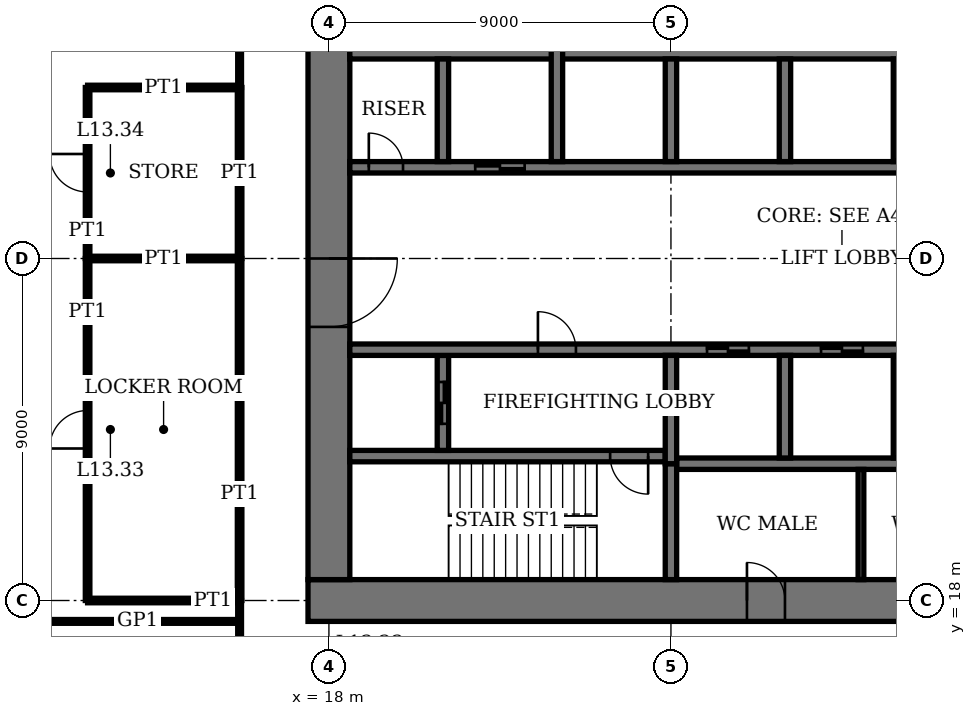
"""IFC4 building model, lengths in metres.
Left out: names, types, materials, properties, quantities, classifications, styles, units other than length and angle.
Written with IfcOpenShell. Run it as: python <this file> out.ifc"""

import sys

from ifc_helpers import new_model, si_unit, direction, frame, frame_2d, origin, place, context, subcontext, project, spatial, rectangle, extrude, element, fill, save


model = new_model("IFC4")
c1 = context("Model", 3, precision=1e-05, world=origin(), true_north=direction((0.0, 1.0)))
c2 = subcontext(c1, "Body", "Model", "MODEL_VIEW")
j1 = project(units=[si_unit("LENGTHUNIT", "METRE"), si_unit("PLANEANGLEUNIT", "RADIAN")], contexts=[c1])
p1 = place(None, origin())
s1 = spatial("IfcSite", under=j1, at=p1, CompositionType="ELEMENT")
p2 = place(p1, origin())
s2 = spatial("IfcBuilding", under=s1, at=p2, CompositionType="ELEMENT")
p3 = place(p2, frame((0.0, 0.0, 55.8)))
s3 = spatial("IfcBuildingStorey", under=s2, at=p3, CompositionType="ELEMENT", Elevation=55.8)
p4 = place(p3, frame((17.45, 18.0, 0.0), z_axis=(0.0, 0.0, 1.0), x_axis=(1.0, 0.0, 0.0)))
e1 = element("IfcWall", 1, at=p4, inside=s3, PredefinedType="SHEAR", context=c2, shape_type="SweptSolid", body=[
    extrude(rectangle(XDim=28.1, YDim=1.1, at=frame_2d((14.05, 0.0))), origin(), (0.0, 0.0, 1.0), 4.0),
])
p5 = place(p4, frame((11.55, 0.0, 0.0)))
e2 = element("IfcOpeningElement", 2, at=p5, cuts=e1, PredefinedType="OPENING", context=c2, shape_type="SweptSolid", body=[
    extrude(rectangle(XDim=1.0, YDim=2.4, at=frame_2d((0.5, 1.2))), frame((0.0, 0.56, 0.0), z_axis=(0.0, -1.0, 0.0), x_axis=(1.0, 0.0, 0.0)), (0.0, 0.0, 1.0), 1.12),
])
p6 = place(p4, frame((16.55, 0.0, 0.0)))
e3 = element("IfcOpeningElement", 3, at=p6, cuts=e1, PredefinedType="OPENING", context=c2, shape_type="SweptSolid", body=[
    extrude(rectangle(XDim=1.0, YDim=2.4, at=frame_2d((0.5, 1.2))), frame((0.0, 0.56, 0.0), z_axis=(0.0, -1.0, 0.0), x_axis=(1.0, 0.0, 0.0)), (0.0, 0.0, 1.0), 1.12),
])
p7 = place(p4, frame((20.0, 0.0, 0.0)))
e4 = element("IfcOpeningElement", 4, at=p7, cuts=e1, PredefinedType="OPENING", context=c2, shape_type="SweptSolid", body=[
    extrude(rectangle(XDim=1.1, YDim=2.4, at=frame_2d((0.55, 1.2))), frame((0.0, 0.56, 0.0), z_axis=(0.0, -1.0, 0.0), x_axis=(1.0, 0.0, 0.0)), (0.0, 0.0, 1.0), 1.12),
])
p8 = place(p4, frame((24.05, 0.0, 0.0)))
e5 = element("IfcOpeningElement", 5, at=p8, cuts=e1, PredefinedType="OPENING", context=c2, shape_type="SweptSolid", body=[
    extrude(rectangle(XDim=1.0, YDim=2.4, at=frame_2d((0.5, 1.2))), frame((0.0, 0.56, 0.0), z_axis=(0.0, -1.0, 0.0), x_axis=(1.0, 0.0, 0.0)), (0.0, 0.0, 1.0), 1.12),
])
p9 = place(p3, frame((18.0, 35.45, 0.0), z_axis=(0.0, 0.0, 1.0), x_axis=(0.0, -1.0, 0.0)))
e6 = element("IfcWall", 6, at=p9, inside=s3, PredefinedType="SHEAR", context=c2, shape_type="SweptSolid", body=[
    extrude(rectangle(XDim=16.9, YDim=1.1, at=frame_2d((8.45, 0.0))), origin(), (0.0, 0.0, 1.0), 4.0),
])
p10 = place(p9, frame((8.45, 0.0, 0.0)))
e7 = element("IfcOpeningElement", 7, at=p10, cuts=e6, PredefinedType="OPENING", context=c2, shape_type="SweptSolid", body=[
    extrude(rectangle(XDim=1.8, YDim=2.4, at=frame_2d((0.9, 1.2))), frame((0.0, 0.56, 0.0), z_axis=(0.0, -1.0, 0.0), x_axis=(1.0, 0.0, 0.0)), (0.0, 0.0, 1.0), 1.12),
])
p11 = place(p3, frame((18.55, 21.8, 0.0), z_axis=(0.0, 0.0, 1.0), x_axis=(1.0, 0.0, 0.0)))
e8 = element("IfcWall", 8, at=p11, inside=s3, PredefinedType="SHEAR", context=c2, shape_type="SweptSolid", body=[
    extrude(rectangle(XDim=8.3, YDim=0.3, at=frame_2d((4.15, 0.0))), origin(), (0.0, 0.0, 1.0), 4.0),
])
p12 = place(p11, frame((6.85, 0.0, 0.0)))
e9 = element("IfcOpeningElement", 9, at=p12, cuts=e8, PredefinedType="OPENING", context=c2, shape_type="SweptSolid", body=[
    extrude(rectangle(XDim=1.0, YDim=2.4, at=frame_2d((0.5, 1.2))), frame((0.0, 0.16, 0.0), z_axis=(0.0, -1.0, 0.0), x_axis=(1.0, 0.0, 0.0)), (0.0, 0.0, 1.0), 0.32),
])
p13 = place(p3, frame((27.0, 18.55, 0.0), z_axis=(0.0, 0.0, 1.0), x_axis=(0.0, 1.0, 0.0)))
e10 = element("IfcWall", 10, at=p13, inside=s3, PredefinedType="SHEAR", context=c2, shape_type="SweptSolid", body=[
    extrude(rectangle(XDim=3.05, YDim=0.3, at=frame_2d((1.525, 0.0))), origin(), (0.0, 0.0, 1.0), 4.0),
])
p14 = place(p3, frame((21.0, 21.95, 0.0), z_axis=(0.0, 0.0, 1.0), x_axis=(0.0, 1.0, 0.0)))
e11 = element("IfcWall", 11, at=p14, inside=s3, PredefinedType="SHEAR", context=c2, shape_type="SweptSolid", body=[
    extrude(rectangle(XDim=2.5, YDim=0.3, at=frame_2d((1.25, 0.0))), origin(), (0.0, 0.0, 1.0), 4.0),
])
p15 = place(p14, frame((0.7, 0.0, 0.0)))
e12 = element("IfcOpeningElement", 12, at=p15, cuts=e11, PredefinedType="OPENING", context=c2, shape_type="SweptSolid", body=[
    extrude(rectangle(XDim=1.1, YDim=2.4, at=frame_2d((0.55, 1.2))), frame((0.0, 0.16, 0.0), z_axis=(0.0, -1.0, 0.0), x_axis=(1.0, 0.0, 0.0)), (0.0, 0.0, 1.0), 0.32),
])
p16 = place(p3, frame((18.55, 24.6, 0.0), z_axis=(0.0, 0.0, 1.0), x_axis=(1.0, 0.0, 0.0)))
e13 = element("IfcWall", 13, at=p16, inside=s3, PredefinedType="SHEAR", context=c2, shape_type="SweptSolid", body=[
    extrude(rectangle(XDim=25.9, YDim=0.3, at=frame_2d((12.95, 0.0))), origin(), (0.0, 0.0, 1.0), 4.0),
])
p17 = place(p16, frame((4.95, 0.0, 0.0)))
e14 = element("IfcOpeningElement", 14, at=p17, cuts=e13, PredefinedType="OPENING", context=c2, shape_type="SweptSolid", body=[
    extrude(rectangle(XDim=1.0, YDim=2.4, at=frame_2d((0.5, 1.2))), frame((0.0, 0.16, 0.0), z_axis=(0.0, -1.0, 0.0), x_axis=(1.0, 0.0, 0.0)), (0.0, 0.0, 1.0), 0.32),
])
p18 = place(p16, frame((24.5, 0.0, 0.0)))
e15 = element("IfcOpeningElement", 15, at=p18, cuts=e13, PredefinedType="OPENING", context=c2, shape_type="SweptSolid", body=[
    extrude(rectangle(XDim=0.9, YDim=2.1, at=frame_2d((0.45, 1.05))), frame((0.0, 0.16, 0.0), z_axis=(0.0, -1.0, 0.0), x_axis=(1.0, 0.0, 0.0)), (0.0, 0.0, 1.0), 0.32),
])
p19 = place(p16, frame((9.4, 0.0, 0.0)))
e16 = element("IfcOpeningElement", 16, at=p19, cuts=e13, PredefinedType="OPENING", context=c2, shape_type="SweptSolid", body=[
    extrude(rectangle(XDim=1.1, YDim=2.4, at=frame_2d((0.55, 1.2))), frame((0.0, 0.16, 0.0), z_axis=(0.0, -1.0, 0.0), x_axis=(1.0, 0.0, 0.0)), (0.0, 0.0, 1.0), 0.32),
])
p20 = place(p16, frame((12.4, 0.0, 0.0)))
e17 = element("IfcOpeningElement", 17, at=p20, cuts=e13, PredefinedType="OPENING", context=c2, shape_type="SweptSolid", body=[
    extrude(rectangle(XDim=1.1, YDim=2.4, at=frame_2d((0.55, 1.2))), frame((0.0, 0.16, 0.0), z_axis=(0.0, -1.0, 0.0), x_axis=(1.0, 0.0, 0.0)), (0.0, 0.0, 1.0), 0.32),
])
p21 = place(p16, frame((15.4, 0.0, 0.0)))
e18 = element("IfcOpeningElement", 18, at=p21, cuts=e13, PredefinedType="OPENING", context=c2, shape_type="SweptSolid", body=[
    extrude(rectangle(XDim=1.1, YDim=2.4, at=frame_2d((0.55, 1.2))), frame((0.0, 0.16, 0.0), z_axis=(0.0, -1.0, 0.0), x_axis=(1.0, 0.0, 0.0)), (0.0, 0.0, 1.0), 0.32),
])
p22 = place(p16, frame((18.4, 0.0, 0.0)))
e19 = element("IfcOpeningElement", 19, at=p22, cuts=e13, PredefinedType="OPENING", context=c2, shape_type="SweptSolid", body=[
    extrude(rectangle(XDim=1.1, YDim=2.4, at=frame_2d((0.55, 1.2))), frame((0.0, 0.16, 0.0), z_axis=(0.0, -1.0, 0.0), x_axis=(1.0, 0.0, 0.0)), (0.0, 0.0, 1.0), 0.32),
])
p23 = place(p16, frame((21.3, 0.0, 0.0)))
e20 = element("IfcOpeningElement", 20, at=p23, cuts=e13, PredefinedType="OPENING", context=c2, shape_type="SweptSolid", body=[
    extrude(rectangle(XDim=1.3, YDim=2.4, at=frame_2d((0.65, 1.2))), frame((0.0, 0.16, 0.0), z_axis=(0.0, -1.0, 0.0), x_axis=(1.0, 0.0, 0.0)), (0.0, 0.0, 1.0), 0.32),
])
p24 = place(p3, frame((18.55, 29.4, 0.0), z_axis=(0.0, 0.0, 1.0), x_axis=(1.0, 0.0, 0.0)))
e21 = element("IfcWall", 21, at=p24, inside=s3, PredefinedType="SHEAR", context=c2, shape_type="SweptSolid", body=[
    extrude(rectangle(XDim=25.9, YDim=0.3, at=frame_2d((12.95, 0.0))), origin(), (0.0, 0.0, 1.0), 4.0),
])
p25 = place(p24, frame((19.95, 0.0, 0.0)))
e22 = element("IfcOpeningElement", 22, at=p25, cuts=e21, PredefinedType="OPENING", context=c2, shape_type="SweptSolid", body=[
    extrude(rectangle(XDim=1.0, YDim=2.4, at=frame_2d((0.5, 1.2))), frame((0.0, 0.16, 0.0), z_axis=(0.0, -1.0, 0.0), x_axis=(1.0, 0.0, 0.0)), (0.0, 0.0, 1.0), 0.32),
])
p26 = place(p24, frame((0.5, 0.0, 0.0)))
e23 = element("IfcOpeningElement", 23, at=p26, cuts=e21, PredefinedType="OPENING", context=c2, shape_type="SweptSolid", body=[
    extrude(rectangle(XDim=0.9, YDim=2.1, at=frame_2d((0.45, 1.05))), frame((0.0, 0.16, 0.0), z_axis=(0.0, -1.0, 0.0), x_axis=(1.0, 0.0, 0.0)), (0.0, 0.0, 1.0), 0.32),
])
p27 = place(p24, frame((3.3, 0.0, 0.0)))
e24 = element("IfcOpeningElement", 24, at=p27, cuts=e21, PredefinedType="OPENING", context=c2, shape_type="SweptSolid", body=[
    extrude(rectangle(XDim=1.3, YDim=2.4, at=frame_2d((0.65, 1.2))), frame((0.0, 0.16, 0.0), z_axis=(0.0, -1.0, 0.0), x_axis=(1.0, 0.0, 0.0)), (0.0, 0.0, 1.0), 0.32),
])
for number, where, z_axis, x_axis in (
    (25, (27.15, 21.6, 0.0), (0.0, 0.0, 1.0), (1.0, 0.0, 0.0)),
    (26, (18.55, 32.4, 0.0), (0.0, 0.0, 1.0), (1.0, 0.0, 0.0)),
):
    element("IfcWall", number, at=place(p3, frame(where, z_axis=z_axis, x_axis=x_axis)), inside=s3, PredefinedType="SHEAR", context=c2, shape_type="SweptSolid", body=[
        extrude(rectangle(XDim=17.3, YDim=0.3, at=frame_2d((8.65, 0.0))), origin(), (0.0, 0.0, 1.0), 4.0),
    ])
for number, where, z_axis, x_axis in (
    (27, (30.0, 21.75, 0.0), (0.0, 0.0, 1.0), (0.0, 1.0, 0.0)),
    (28, (33.0, 29.55, 0.0), (0.0, 0.0, 1.0), (0.0, 1.0, 0.0)),
    (29, (33.0, 21.75, 0.0), (0.0, 0.0, 1.0), (0.0, 1.0, 0.0)),
    (30, (30.0, 29.55, 0.0), (0.0, 0.0, 1.0), (0.0, 1.0, 0.0)),
    (31, (27.0, 29.55, 0.0), (0.0, 0.0, 1.0), (0.0, 1.0, 0.0)),
):
    element("IfcWall", number, at=place(p3, frame(where, z_axis=z_axis, x_axis=x_axis)), inside=s3, PredefinedType="SHEAR", context=c2, shape_type="SweptSolid", body=[
        extrude(rectangle(XDim=2.7, YDim=0.3, at=frame_2d((1.35, 0.0))), origin(), (0.0, 0.0, 1.0), 4.0),
    ])
p28 = place(p3, frame((24.0, 29.55, 0.0), z_axis=(0.0, 0.0, 1.0), x_axis=(0.0, 1.0, 0.0)))
e32 = element("IfcWall", 32, at=p28, inside=s3, PredefinedType="SHEAR", context=c2, shape_type="SweptSolid", body=[
    extrude(rectangle(XDim=5.9, YDim=0.3, at=frame_2d((2.95, 0.0))), origin(), (0.0, 0.0, 1.0), 4.0),
])
p29 = place(p3, frame((21.0, 29.55, 0.0), z_axis=(0.0, 0.0, 1.0), x_axis=(0.0, 1.0, 0.0)))
e33 = element("IfcWall", 33, at=p29, inside=s3, PredefinedType="SHEAR", context=c2, shape_type="SweptSolid", body=[
    extrude(rectangle(XDim=2.7, YDim=0.3, at=frame_2d((1.35, 0.0))), origin(), (0.0, 0.0, 1.0), 4.0),
])
p30 = place(p3, frame((27.0, 21.6, 0.0), z_axis=(0.0, 0.0, 1.0), x_axis=(0.0, 1.0, 0.0)))
e34 = element("IfcWall", 34, at=p30, inside=s3, PredefinedType="SHEAR", context=c2, shape_type="SweptSolid", body=[
    extrude(rectangle(XDim=2.85, YDim=0.3, at=frame_2d((1.425, 0.0))), origin(), (0.0, 0.0, 1.0), 4.0),
])
p31 = place(p3, frame((10.075, 17.45, 0.0), z_axis=(0.0, 0.0, 1.0), x_axis=(1.0, 0.0, 0.0)))
e35 = element("IfcWall", 35, at=p31, inside=s3, PredefinedType="PARTITIONING", context=c2, shape_type="SweptSolid", body=[
    extrude(rectangle(XDim=5.575, YDim=0.1, at=frame_2d((2.788, 0.0))), origin(), (0.0, 0.0, 1.0), 3.75),
])
for number, where, z_axis, x_axis in (
    (36, (11.65, 18.0, 0.0), (0.0, 0.0, 1.0), (1.0, 0.0, 0.0)),
    (37, (11.65, 27.0, 0.0), (0.0, 0.0, 1.0), (1.0, 0.0, 0.0)),
):
    element("IfcWall", number, at=place(p3, frame(where, z_axis=z_axis, x_axis=x_axis)), inside=s3, PredefinedType="PARTITIONING", context=c2, shape_type="SweptSolid", body=[
        extrude(rectangle(XDim=4.0, YDim=0.12, at=frame_2d((2.0, 0.0))), origin(), (0.0, 0.0, 1.0), 3.05),
    ])
p32 = place(p3, frame((11.65, 31.5, 0.0), z_axis=(0.0, 0.0, 1.0), x_axis=(1.0, 0.0, 0.0)))
e38 = element("IfcWall", 38, at=p32, inside=s3, PredefinedType="PARTITIONING", context=c2, shape_type="SweptSolid", body=[
    extrude(rectangle(XDim=4.0, YDim=0.12, at=frame_2d((2.0, 0.0))), origin(), (0.0, 0.0, 1.0), 3.1),
])
p33 = place(p3, frame((11.65, 18.0, 0.0), z_axis=(0.0, 0.0, 1.0), x_axis=(0.0, 1.0, 0.0)))
e39 = element("IfcWall", 39, at=p33, inside=s3, PredefinedType="PARTITIONING", context=c2, shape_type="SweptSolid", body=[
    extrude(rectangle(XDim=9.0, YDim=0.12, at=frame_2d((4.5, 0.0))), origin(), (0.0, 0.0, 1.0), 3.75),
])
p34 = place(p33, frame((4.0, 0.0, 0.0)))
e40 = element("IfcOpeningElement", 40, at=p34, cuts=e39, PredefinedType="OPENING", context=c2, shape_type="SweptSolid", body=[
    extrude(rectangle(XDim=1.0, YDim=2.4, at=frame_2d((0.5, 1.2))), frame((0.0, 0.07, 0.0), z_axis=(0.0, -1.0, 0.0), x_axis=(1.0, 0.0, 0.0)), (0.0, 0.0, 1.0), 0.14),
])
p35 = place(p3, frame((11.65, 27.0, 0.0), z_axis=(0.0, 0.0, 1.0), x_axis=(0.0, 1.0, 0.0)))
e41 = element("IfcWall", 41, at=p35, inside=s3, PredefinedType="PARTITIONING", context=c2, shape_type="SweptSolid", body=[
    extrude(rectangle(XDim=4.5, YDim=0.12, at=frame_2d((2.25, 0.0))), origin(), (0.0, 0.0, 1.0), 3.75),
])
p36 = place(p35, frame((1.75, 0.0, 0.0)))
e42 = element("IfcOpeningElement", 42, at=p36, cuts=e41, PredefinedType="OPENING", context=c2, shape_type="SweptSolid", body=[
    extrude(rectangle(XDim=1.0, YDim=2.4, at=frame_2d((0.5, 1.2))), frame((0.0, 0.07, 0.0), z_axis=(0.0, -1.0, 0.0), x_axis=(1.0, 0.0, 0.0)), (0.0, 0.0, 1.0), 0.14),
])
p37 = place(p3, frame((15.65, 18.0, 0.0), z_axis=(0.0, 0.0, 1.0), x_axis=(0.0, 1.0, 0.0)))
e43 = element("IfcWall", 43, at=p37, inside=s3, PredefinedType="PARTITIONING", context=c2, shape_type="SweptSolid", body=[
    extrude(rectangle(XDim=9.0, YDim=0.12, at=frame_2d((4.5, 0.0))), origin(), (0.0, 0.0, 1.0), 3.75),
])
p38 = place(p3, frame((15.65, 27.0, 0.0), z_axis=(0.0, 0.0, 1.0), x_axis=(0.0, 1.0, 0.0)))
e44 = element("IfcWall", 44, at=p38, inside=s3, PredefinedType="PARTITIONING", context=c2, shape_type="SweptSolid", body=[
    extrude(rectangle(XDim=4.5, YDim=0.12, at=frame_2d((2.25, 0.0))), origin(), (0.0, 0.0, 1.0), 3.75),
])
p39 = place(p3, frame((15.65, 15.65, 0.0), z_axis=(0.0, 0.0, 1.0), x_axis=(0.0, 1.0, 0.0)))
e45 = element("IfcWall", 45, at=p39, inside=s3, PredefinedType="PARTITIONING", context=c2, shape_type="SweptSolid", body=[
    extrude(rectangle(XDim=2.35, YDim=0.1, at=frame_2d((1.175, 0.0))), origin(), (0.0, 0.0, 1.0), 3.75),
])
p40 = place(p3, frame((15.65, 31.5, 0.0), z_axis=(0.0, 0.0, 1.0), x_axis=(0.0, 1.0, 0.0)))
e46 = element("IfcWall", 46, at=p40, inside=s3, PredefinedType="PARTITIONING", context=c2, shape_type="SweptSolid", body=[
    extrude(rectangle(XDim=6.85, YDim=0.1, at=frame_2d((3.425, 0.0))), origin(), (0.0, 0.0, 1.0), 3.75),
])
p41 = place(p40, frame((2.925, 0.0, 0.0)))
e47 = element("IfcOpeningElement", 47, at=p41, cuts=e46, PredefinedType="OPENING", context=c2, shape_type="SweptSolid", body=[
    extrude(rectangle(XDim=1.0, YDim=2.4, at=frame_2d((0.5, 1.2))), frame((0.0, 0.06, 0.0), z_axis=(0.0, -1.0, 0.0), x_axis=(1.0, 0.0, 0.0)), (0.0, 0.0, 1.0), 0.12),
])
p42 = place(p3, frame((32.0, 18.55, 0.0), z_axis=(0.0, 0.0, 1.0), x_axis=(0.0, 1.0, 0.0)))
e48 = element("IfcWall", 48, at=p42, inside=s3, PredefinedType="PARTITIONING", context=c2, shape_type="SweptSolid", body=[
    extrude(rectangle(XDim=2.9, YDim=0.15, at=frame_2d((1.45, 0.0))), origin(), (0.0, 0.0, 1.0), 3.75),
])
p43 = place(p10, origin())
e49 = element("IfcDoor", 49, at=p43, inside=s3, OperationType="DOUBLE_DOOR_DOUBLE_SWING", PredefinedType="DOOR", context=c2, shape_type="SweptSolid", body=[
    extrude(rectangle(XDim=1.8, YDim=2.4, at=frame_2d((0.9, 1.2))), frame((0.0, 0.03, 0.0), z_axis=(0.0, -1.0, 0.0), x_axis=(1.0, 0.0, 0.0)), (0.0, 0.0, 1.0), 0.06),
    extrude(rectangle(XDim=0.04, YDim=2.4, at=frame_2d((0.02, 1.2))), frame((0.0, 0.55, 0.0), z_axis=(0.0, -1.0, 0.0), x_axis=(1.0, 0.0, 0.0)), (0.0, 0.0, 1.0), 1.1),
    extrude(rectangle(XDim=0.04, YDim=2.4, at=frame_2d((1.78, 1.2))), frame((0.0, 0.55, 0.0), z_axis=(0.0, -1.0, 0.0), x_axis=(1.0, 0.0, 0.0)), (0.0, 0.0, 1.0), 1.1),
    extrude(rectangle(XDim=1.8, YDim=0.04, at=frame_2d((0.9, 2.38))), frame((0.0, 0.55, 0.0), z_axis=(0.0, -1.0, 0.0), x_axis=(1.0, 0.0, 0.0)), (0.0, 0.0, 1.0), 1.1),
])
fill(e7, e49)
p44 = place(p5, origin())
e50 = element("IfcDoor", 50, at=p44, inside=s3, OperationType="SINGLE_SWING_RIGHT", PredefinedType="DOOR", context=c2, shape_type="SweptSolid", body=[
    extrude(rectangle(XDim=1.0, YDim=2.4, at=frame_2d((0.5, 1.2))), frame((0.0, 0.025, 0.0), z_axis=(0.0, -1.0, 0.0), x_axis=(1.0, 0.0, 0.0)), (0.0, 0.0, 1.0), 0.05),
    extrude(rectangle(XDim=0.04, YDim=2.4, at=frame_2d((0.02, 1.2))), frame((0.0, 0.4, 0.0), z_axis=(0.0, -1.0, 0.0), x_axis=(1.0, 0.0, 0.0)), (0.0, 0.0, 1.0), 0.8),
    extrude(rectangle(XDim=0.04, YDim=2.4, at=frame_2d((0.98, 1.2))), frame((0.0, 0.4, 0.0), z_axis=(0.0, -1.0, 0.0), x_axis=(1.0, 0.0, 0.0)), (0.0, 0.0, 1.0), 0.8),
    extrude(rectangle(XDim=1.0, YDim=0.04, at=frame_2d((0.5, 2.38))), frame((0.0, 0.4, 0.0), z_axis=(0.0, -1.0, 0.0), x_axis=(1.0, 0.0, 0.0)), (0.0, 0.0, 1.0), 0.8),
])
fill(e2, e50)
p45 = place(p12, origin())
e51 = element("IfcDoor", 51, at=p45, inside=s3, OperationType="SINGLE_SWING_RIGHT", PredefinedType="DOOR", context=c2, shape_type="SweptSolid", body=[
    extrude(rectangle(XDim=1.0, YDim=2.4, at=frame_2d((0.5, 1.2))), frame((0.0, 0.03, 0.0), z_axis=(0.0, -1.0, 0.0), x_axis=(1.0, 0.0, 0.0)), (0.0, 0.0, 1.0), 0.06),
])
fill(e9, e51)
p46 = place(p17, origin())
e52 = element("IfcDoor", 52, at=p46, inside=s3, OperationType="SINGLE_SWING_RIGHT", PredefinedType="DOOR", context=c2, shape_type="SweptSolid", body=[
    extrude(rectangle(XDim=1.0, YDim=2.4, at=frame_2d((0.5, 1.2))), frame((0.0, 0.03, 0.0), z_axis=(0.0, -1.0, 0.0), x_axis=(1.0, 0.0, 0.0)), (0.0, 0.0, 1.0), 0.06),
])
fill(e14, e52)
p47 = place(p26, origin())
e53 = element("IfcDoor", 53, at=p47, inside=s3, OperationType="SINGLE_SWING_RIGHT", PredefinedType="DOOR", context=c2, shape_type="SweptSolid", body=[
    extrude(rectangle(XDim=0.9, YDim=2.1, at=frame_2d((0.45, 1.05))), frame((0.0, 0.03, 0.0), z_axis=(0.0, -1.0, 0.0), x_axis=(1.0, 0.0, 0.0)), (0.0, 0.0, 1.0), 0.06),
])
fill(e23, e53)
p48 = place(p34, origin())
e54 = element("IfcDoor", 54, at=p48, inside=s3, OperationType="SINGLE_SWING_RIGHT", PredefinedType="DOOR", context=c2, shape_type="SweptSolid", body=[
    extrude(rectangle(XDim=1.0, YDim=2.4, at=frame_2d((0.5, 1.2))), frame((0.0, 0.025, 0.0), z_axis=(0.0, -1.0, 0.0), x_axis=(1.0, 0.0, 0.0)), (0.0, 0.0, 1.0), 0.05),
])
fill(e40, e54)
p49 = place(p36, origin())
e55 = element("IfcDoor", 55, at=p49, inside=s3, OperationType="SINGLE_SWING_LEFT", PredefinedType="DOOR", context=c2, shape_type="SweptSolid", body=[
    extrude(rectangle(XDim=1.0, YDim=2.4, at=frame_2d((0.5, 1.2))), frame((0.0, 0.025, 0.0), z_axis=(0.0, -1.0, 0.0), x_axis=(1.0, 0.0, 0.0)), (0.0, 0.0, 1.0), 0.05),
])
fill(e42, e55)
p50 = place(p19, origin())
e56 = element("IfcDoor", 56, at=p50, inside=s3, OperationType="DOUBLE_DOOR_SLIDING", PredefinedType="DOOR", context=c2, shape_type="SweptSolid", body=[
    extrude(rectangle(XDim=1.1, YDim=2.4, at=frame_2d((0.55, 1.2))), frame((0.0, 0.02, 0.0), z_axis=(0.0, -1.0, 0.0), x_axis=(1.0, 0.0, 0.0)), (0.0, 0.0, 1.0), 0.04),
])
fill(e16, e56)
p51 = place(p20, origin())
e57 = element("IfcDoor", 57, at=p51, inside=s3, OperationType="DOUBLE_DOOR_SLIDING", PredefinedType="DOOR", context=c2, shape_type="SweptSolid", body=[
    extrude(rectangle(XDim=1.1, YDim=2.4, at=frame_2d((0.55, 1.2))), frame((0.0, 0.02, 0.0), z_axis=(0.0, -1.0, 0.0), x_axis=(1.0, 0.0, 0.0)), (0.0, 0.0, 1.0), 0.04),
])
fill(e17, e57)
p52 = place(p27, origin())
e58 = element("IfcDoor", 58, at=p52, inside=s3, OperationType="DOUBLE_DOOR_SLIDING", PredefinedType="DOOR", context=c2, shape_type="SweptSolid", body=[
    extrude(rectangle(XDim=1.3, YDim=2.4, at=frame_2d((0.65, 1.2))), frame((0.0, 0.02, 0.0), z_axis=(0.0, -1.0, 0.0), x_axis=(1.0, 0.0, 0.0)), (0.0, 0.0, 1.0), 0.04),
])
fill(e24, e58)
p53 = place(p15, origin())
e59 = element("IfcDoor", 59, at=p53, inside=s3, OperationType="DOUBLE_DOOR_SLIDING", PredefinedType="DOOR", context=c2, shape_type="SweptSolid", body=[
    extrude(rectangle(XDim=1.1, YDim=2.4, at=frame_2d((0.55, 1.2))), frame((0.0, 0.03, 0.0), z_axis=(0.0, -1.0, 0.0), x_axis=(1.0, 0.0, 0.0)), (0.0, 0.0, 1.0), 0.06),
])
fill(e12, e59)
save(model, sys.argv[1])
